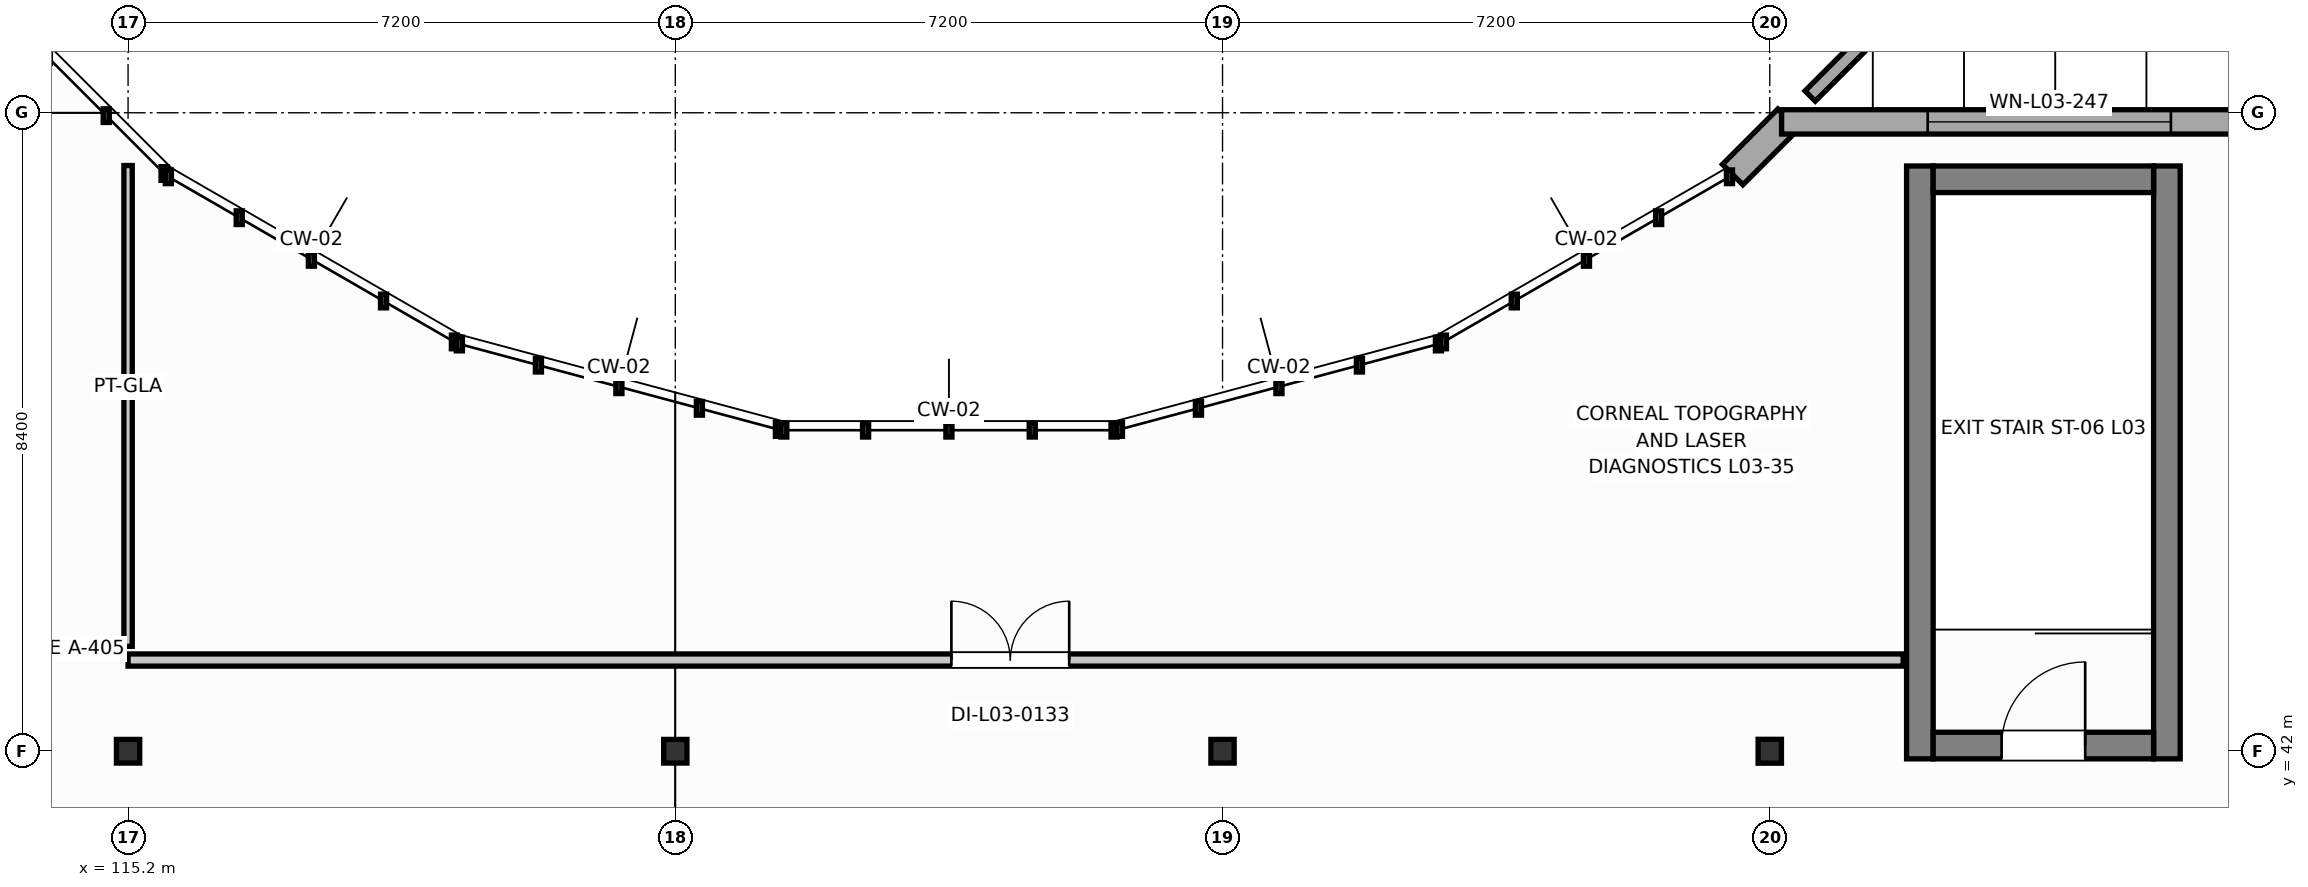
"""IFC4 building model, lengths in metres.
Left out: names, types, materials, properties, quantities, classifications, styles, units other than length and angle.
Written with IfcOpenShell. Run it as: python <this file> out.ifc"""

import sys

from ifc_helpers import new_model, si_unit, direction, frame, frame_2d, origin, origin_2d, place, context, subcontext, project, spatial, rectangle, i_section, extrude, element, fill, save


model = new_model("IFC4")
c1 = context("Model", 3, precision=1e-05, world=origin(), true_north=direction((0.0, 1.0)))
c2 = subcontext(c1, "Body", "Model", "MODEL_VIEW")
j1 = project(units=[si_unit("LENGTHUNIT", "METRE"), si_unit("PLANEANGLEUNIT", "RADIAN")], contexts=[c1])
p1 = place(None, origin())
s1 = spatial("IfcSite", under=j1, at=p1, CompositionType="ELEMENT")
p2 = place(p1, origin())
s2 = spatial("IfcBuilding", under=s1, at=p2, CompositionType="ELEMENT")
p3 = place(p2, frame((0.0, 0.0, 13.2)))
s3 = spatial("IfcBuildingStorey", under=s2, at=p3, CompositionType="ELEMENT", Elevation=13.2)
for number, where, z_axis, x_axis in (
    (1, (115.2, 42.0, 0.0), (0.0, 0.0, 1.0), (1.0, 0.0, 0.0)),
    (2, (122.4, 42.0, 0.0), (0.0, 0.0, 1.0), (1.0, 0.0, 0.0)),
    (3, (129.6, 42.0, 0.0), (0.0, 0.0, 1.0), (1.0, 0.0, 0.0)),
):
    element("IfcColumn", number, at=place(p3, frame(where, z_axis=z_axis, x_axis=x_axis)), inside=s3, PredefinedType="COLUMN", context=c2, shape_type="SweptSolid", body=[
        extrude(i_section(OverallWidth=0.306, OverallDepth=0.311, WebThickness=0.011, FlangeThickness=0.017, FilletRadius=0.015, at=origin_2d()), origin(), (0.0, 0.0, 1.0), 4.2),
    ])
p4 = place(p3, frame((136.8, 42.0, 0.0), z_axis=(0.0, 0.0, 1.0), x_axis=(1.0, 0.0, 0.0)))
e4 = element("IfcColumn", 4, at=p4, inside=s3, PredefinedType="COLUMN", context=c2, shape_type="SweptSolid", body=[
    extrude(i_section(OverallWidth=0.307, OverallDepth=0.314, WebThickness=0.012, FlangeThickness=0.019, FilletRadius=0.016, at=origin_2d()), origin(), (0.0, 0.0, 1.0), 4.2),
])
for number, where, z_axis, x_axis in (
    (5, (138.775, 41.9, 0.0), (0.0, 0.0, 1.0), (0.0, 1.0, 0.0)),
    (6, (142.025, 41.9, 0.0), (0.0, 0.0, 1.0), (0.0, 1.0, 0.0)),
):
    element("IfcWall", number, at=place(p3, frame(where, z_axis=z_axis, x_axis=x_axis)), inside=s3, PredefinedType="SHEAR", context=c2, shape_type="SweptSolid", body=[
        extrude(rectangle(XDim=7.8, YDim=0.35, at=frame_2d((3.9, 0.0))), origin(), (0.0, 0.0, 1.0), 3.975),
    ])
p5 = place(p3, frame((138.95, 49.525, 0.0), z_axis=(0.0, 0.0, 1.0), x_axis=(1.0, 0.0, 0.0)))
e7 = element("IfcWall", 7, at=p5, inside=s3, PredefinedType="SHEAR", context=c2, shape_type="SweptSolid", body=[
    extrude(rectangle(XDim=2.9, YDim=0.35, at=frame_2d((1.45, 0.0))), origin(), (0.0, 0.0, 1.0), 3.975),
])
p6 = place(p3, frame((138.95, 42.075, 0.0), z_axis=(0.0, 0.0, 1.0), x_axis=(1.0, 0.0, 0.0)))
e8 = element("IfcWall", 8, at=p6, inside=s3, PredefinedType="SHEAR", context=c2, shape_type="SweptSolid", body=[
    extrude(rectangle(XDim=2.9, YDim=0.35, at=frame_2d((1.45, 0.0))), origin(), (0.0, 0.0, 1.0), 3.975),
])
p7 = place(p6, frame((0.9, 0.0, 0.0)))
e9 = element("IfcOpeningElement", 9, at=p7, cuts=e8, PredefinedType="OPENING", context=c2, shape_type="SweptSolid", body=[
    extrude(rectangle(XDim=1.1, YDim=2.15, at=frame_2d((0.55, 1.075))), frame((0.0, 0.185, 0.0), z_axis=(0.0, -1.0, 0.0), x_axis=(1.0, 0.0, 0.0)), (0.0, 0.0, 1.0), 0.37),
])
p8 = place(p3, frame((136.312, 49.587, 0.0), z_axis=(0.0, 0.0, 1.0), x_axis=(0.707106781187, 0.707106781187, 0.0)))
e10 = element("IfcWall", 10, at=p8, inside=s3, PredefinedType="SOLIDWALL", context=c2, shape_type="SweptSolid", body=[
    extrude(rectangle(XDim=1.03, YDim=0.38, at=frame_2d((0.515, 0.0))), origin(), (0.0, 0.0, 1.0), 3.94),
])
p9 = place(p3, frame((136.956, 50.28, 0.0), z_axis=(0.0, 0.0, 1.0), x_axis=(1.0, 0.0, 0.0)))
e11 = element("IfcWall", 11, at=p9, inside=s3, PredefinedType="SOLIDWALL", context=c2, shape_type="SweptSolid", body=[
    extrude(rectangle(XDim=7.044, YDim=0.32, at=frame_2d((3.522, 0.0))), origin(), (0.0, 0.0, 1.0), 3.94),
])
p10 = place(p9, frame((1.922, 0.0, 0.95)))
e12 = element("IfcOpeningElement", 12, at=p10, cuts=e11, PredefinedType="OPENING", context=c2, shape_type="SweptSolid", body=[
    extrude(rectangle(XDim=3.2, YDim=1.55, at=frame_2d((1.6, 0.775))), frame((0.0, 0.17, 0.0), z_axis=(0.0, -1.0, 0.0), x_axis=(1.0, 0.0, 0.0)), (0.0, 0.0, 1.0), 0.34),
])
p11 = place(p3, frame((137.331, 50.62, 0.0), z_axis=(0.0, 0.0, 1.0), x_axis=(0.707106781187, 0.707106781187, 0.0)))
e13 = element("IfcWall", 13, at=p11, inside=s3, PredefinedType="PARAPET", context=c2, shape_type="SweptSolid", body=[
    extrude(rectangle(XDim=2.715, YDim=0.19, at=frame_2d((1.357, 0.0))), origin(), (0.0, 0.0, 1.0), 1.15),
])
p12 = place(p3, frame((138.555, 43.2, 0.0), z_axis=(0.0, 0.0, 1.0), x_axis=(-1.0, 0.0, 0.0)))
e14 = element("IfcWall", 14, at=p12, inside=s3, PredefinedType="PARTITIONING", context=c2, shape_type="SweptSolid", body=[
    extrude(rectangle(XDim=23.355, YDim=0.16, at=frame_2d((11.677, 0.0))), origin(), (0.0, 0.0, 1.0), 3.945),
])
p13 = place(p12, frame((10.972, 0.0, 0.0)))
e15 = element("IfcOpeningElement", 15, at=p13, cuts=e14, PredefinedType="OPENING", context=c2, shape_type="SweptSolid", body=[
    extrude(rectangle(XDim=1.55, YDim=2.2, at=frame_2d((0.775, 1.1))), frame((0.0, 0.09, 0.0), z_axis=(0.0, -1.0, 0.0), x_axis=(1.0, 0.0, 0.0)), (0.0, 0.0, 1.0), 0.18),
])
p14 = place(p3, frame((115.2, 43.38, 0.0), z_axis=(0.0, 0.0, 1.0), x_axis=(0.0, 1.0, 0.0)))
e16 = element("IfcWall", 16, at=p14, inside=s3, PredefinedType="MOVABLE", context=c2, shape_type="SweptSolid", body=[
    extrude(rectangle(XDim=6.326, YDim=0.11, at=frame_2d((3.163, 0.0))), origin(), (0.0, 0.0, 1.0), 3.945),
])
p15 = place(p7, origin())
e17 = element("IfcDoor", 17, at=p15, inside=s3, OperationType="SINGLE_SWING_RIGHT", PredefinedType="DOOR", context=c2, shape_type="SweptSolid", body=[
    extrude(rectangle(XDim=1.1, YDim=2.15, at=frame_2d((0.55, 1.075))), frame((0.0, 0.025, 0.0), z_axis=(0.0, -1.0, 0.0), x_axis=(1.0, 0.0, 0.0)), (0.0, 0.0, 1.0), 0.05),
])
fill(e9, e17)
p16 = place(p10, origin())
e18 = element("IfcWindow", 18, at=p16, inside=s3, PartitioningType="SINGLE_PANEL", PredefinedType="WINDOW", context=c2, shape_type="SweptSolid", body=[
    extrude(rectangle(XDim=3.2, YDim=1.55, at=frame_2d((1.6, 0.775))), frame((0.0, 0.03, 0.0), z_axis=(0.0, -1.0, 0.0), x_axis=(1.0, 0.0, 0.0)), (0.0, 0.0, 1.0), 0.06),
])
fill(e12, e18)
p17 = place(p13, frame((1.55, 0.0, 0.0), z_axis=(0.0, 0.0, 1.0), x_axis=(-1.0, 0.0, 0.0)))
e19 = element("IfcDoor", 19, at=p17, inside=s3, OperationType="DOUBLE_DOOR_SINGLE_SWING", PredefinedType="DOOR", context=c2, shape_type="SweptSolid", body=[
    extrude(rectangle(XDim=1.55, YDim=2.2, at=frame_2d((0.775, 1.1))), frame((0.0, 0.025, 0.0), z_axis=(0.0, -1.0, 0.0), x_axis=(1.0, 0.0, 0.0)), (0.0, 0.0, 1.0), 0.05),
])
fill(e15, e19)
save(model, sys.argv[1])
